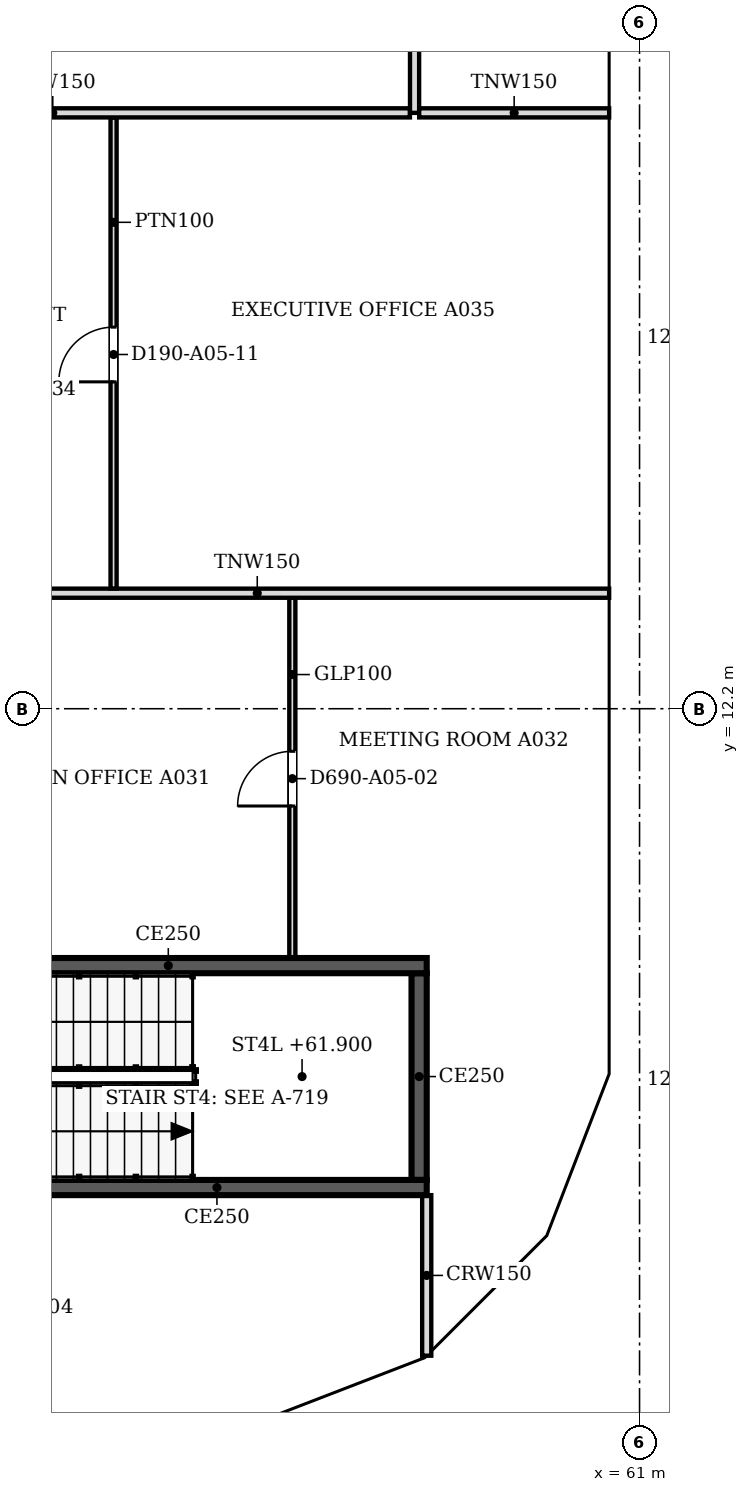
"""IFC4 building model, lengths in metres.
Left out: names, types, materials, properties, quantities, classifications, styles, units other than length and angle.
Written with IfcOpenShell. Run it as: python <this file> out.ifc"""

import sys

from ifc_helpers import new_model, si_unit, direction, frame, frame_2d, origin, place, context, subcontext, project, spatial, polyline, rectangle, outline, extrude, faceted_brep, source, transform, mapped, element, fill, save


model = new_model("IFC4")
c1 = context("Model", 3, precision=1e-05, world=origin(), true_north=direction((0.0, 1.0)))
c2 = subcontext(c1, "Body", "Model", "MODEL_VIEW")
j1 = project(units=[si_unit("LENGTHUNIT", "METRE"), si_unit("PLANEANGLEUNIT", "RADIAN")], contexts=[c1])
p1 = place(None, origin())
s1 = spatial("IfcSite", under=j1, at=p1, CompositionType="ELEMENT")
p2 = place(p1, origin())
s2 = spatial("IfcBuilding", under=s1, at=p2, CompositionType="ELEMENT")
p3 = place(p2, frame((0.0, 0.0, 60.0)))
s3 = spatial("IfcBuildingStorey", under=s2, at=p3, CompositionType="ELEMENT", Elevation=60.0)
m1 = source(origin(), c2, "Body", "Brep", [
    faceted_brep([(2.95, -0.25, 0.0), (3.003, -0.25, 0.068), (3.003, -0.25, 7.532), (2.95, -0.25, 7.6), (0.0, -0.25, 3.8), (0.047, 0.25, 3.86), (2.898, 0.25, 7.532), (2.898, 0.25, 0.068), (0.047, 0.25, 3.74), (2.95, 0.0, 0.0), (2.95, 0.0, 7.6), (0.0, 0.0, 3.8)], [[[0, 1, 2, 3, 4]], [[5, 6, 7, 8]], [[1, 0, 9]], [[10, 3, 2]], [[6, 5, 11, 4, 3, 10]], [[8, 7, 9, 0, 4, 11]], [[8, 11, 5]], [[1, 9, 7, 6, 10, 2]]]),
])
p4 = place(p3, frame((54.854, 0.25, -3.8), z_axis=(0.0, 0.0, 1.0), x_axis=(0.932970071518, 0.359953949349, 0.0)))
e1 = element("IfcWall", 1, at=p4, inside=s3, PredefinedType="SOLIDWALL", context=c2, shape_type="MappedRepresentation", body=[
    mapped(m1, transform((0.0, 0.0, 0.0), scale=1.0)),
])
m2 = source(origin(), c2, "Body", "SweptSolid", [
    extrude(outline(polyline([(2.75, 6.935), (0.316, 3.8), (2.75, 0.665), (2.75, 6.935)])), frame((0.0, 0.26, 0.0), z_axis=(0.0, -1.0, 0.0), x_axis=(1.0, 0.0, 0.0)), (0.0, 0.0, 1.0), 0.52),
])
p5 = place(p4, origin())
e2 = element("IfcOpeningElement", 2, at=p5, cuts=e1, PredefinedType="OPENING", context=c2, shape_type="MappedRepresentation", body=[
    mapped(m2, transform((0.0, 0.0, 0.0), scale=1.0)),
])
m3 = source(origin(), c2, "Body", "Brep", [
    faceted_brep([(0.053, -0.25, 0.0), (2.997, -0.25, 3.8), (0.053, -0.25, 7.6), (0.0, -0.25, 7.532), (0.0, -0.25, 0.068), (0.106, 0.25, 7.532), (2.944, 0.25, 3.868), (2.944, 0.25, 3.732), (0.106, 0.25, 0.068), (2.997, 0.0, 3.8), (0.053, 0.0, 0.0), (0.053, 0.0, 7.6)], [[[0, 1, 2, 3, 4]], [[5, 6, 7, 8]], [[8, 7, 9, 1, 0, 10]], [[6, 5, 11, 2, 1, 9]], [[3, 2, 11]], [[10, 0, 4]], [[8, 10, 4, 3, 11, 5]], [[9, 7, 6]]]),
])
p6 = place(p3, frame((57.569, 1.274, -3.8), z_axis=(0.0, 0.0, 1.0), x_axis=(0.707066050402, 0.707147509625, 0.0)))
e3 = element("IfcWall", 3, at=p6, inside=s3, PredefinedType="SOLIDWALL", context=c2, shape_type="MappedRepresentation", body=[
    mapped(m3, transform((0.0, 0.0, 0.0), scale=1.0)),
])
m4 = source(origin(), c2, "Body", "SweptSolid", [
    extrude(outline(polyline([(0.253, 0.666), (2.681, 3.8), (0.253, 6.934), (0.253, 0.666)])), frame((0.0, 0.26, 0.0), z_axis=(0.0, -1.0, 0.0), x_axis=(1.0, 0.0, 0.0)), (0.0, 0.0, 1.0), 0.52),
])
p7 = place(p6, origin())
e4 = element("IfcOpeningElement", 4, at=p7, cuts=e3, PredefinedType="OPENING", context=c2, shape_type="MappedRepresentation", body=[
    mapped(m4, transform((0.0, 0.0, 0.0), scale=1.0)),
])
m5 = source(origin(), c2, "Body", "Brep", [
    faceted_brep([(2.95, -0.25, 0.0), (2.997, -0.25, 0.059), (2.997, -0.25, 7.541), (2.95, -0.25, 7.6), (0.0, -0.25, 3.8), (0.053, 0.25, 3.868), (2.904, 0.25, 7.54), (2.904, 0.25, 0.06), (0.053, 0.25, 3.732), (2.95, 0.0, 0.0), (2.95, 0.0, 7.6), (0.0, 0.0, 3.8)], [[[0, 1, 2, 3, 4]], [[5, 6, 7, 8]], [[1, 0, 9]], [[10, 3, 2]], [[6, 5, 11, 4, 3, 10]], [[8, 7, 9, 0, 4, 11]], [[8, 11, 5]], [[1, 9, 7, 6, 10, 2]]]),
])
p8 = place(p3, frame((59.688, 3.394, -3.8), z_axis=(0.0, 0.0, 1.0), x_axis=(0.359972353723, 0.932962970624, 0.0)))
e5 = element("IfcWall", 5, at=p8, inside=s3, PredefinedType="SOLIDWALL", context=c2, shape_type="MappedRepresentation", body=[
    mapped(m5, transform((0.0, 0.0, 0.0), scale=1.0)),
])
p9 = place(p8, origin())
e6 = element("IfcOpeningElement", 6, at=p9, cuts=e5, PredefinedType="OPENING", context=c2, shape_type="MappedRepresentation", body=[
    mapped(m2, transform((0.0, 0.0, 0.0), scale=1.0)),
])
m6 = source(origin(), c2, "Body", "Brep", [
    faceted_brep([(0.047, -0.25, 0.0), (3.05, -0.25, 3.8), (0.047, -0.25, 7.6), (0.0, -0.25, 7.54), (0.0, -0.25, 0.06), (0.093, 0.25, 7.541), (3.05, 0.25, 3.8), (0.093, 0.25, 0.059), (0.047, 0.0, 0.0), (0.047, 0.0, 7.6)], [[[0, 1, 2, 3, 4]], [[5, 6, 7]], [[7, 6, 1, 0, 8]], [[6, 5, 9, 2, 1]], [[3, 2, 9]], [[8, 0, 4]], [[7, 8, 4, 3, 9, 5]]]),
])
p10 = place(p3, frame((60.75, 6.1, -3.8), z_axis=(0.0, 0.0, 1.0), x_axis=(0.0, 1.0, 0.0)))
e7 = element("IfcWall", 7, at=p10, inside=s3, PredefinedType="SOLIDWALL", context=c2, shape_type="MappedRepresentation", body=[
    mapped(m6, transform((0.0, 0.0, 0.0), scale=1.0)),
])
m7 = source(origin(), c2, "Body", "SweptSolid", [
    extrude(outline(polyline([(0.247, 0.656), (2.731, 3.8), (0.247, 6.944), (0.247, 0.656)])), frame((0.0, 0.26, 0.0), z_axis=(0.0, -1.0, 0.0), x_axis=(1.0, 0.0, 0.0)), (0.0, 0.0, 1.0), 0.52),
])
p11 = place(p10, origin())
e8 = element("IfcOpeningElement", 8, at=p11, cuts=e7, PredefinedType="OPENING", context=c2, shape_type="MappedRepresentation", body=[
    mapped(m7, transform((0.0, 0.0, 0.0), scale=1.0)),
])
m8 = source(origin(), c2, "Body", "SweptSolid", [
    extrude(outline(polyline([(3.05, 0.0), (6.1, 3.8), (3.05, 7.6), (0.0, 3.8), (3.05, 0.0)])), frame((0.0, 0.25, 0.0), z_axis=(0.0, -1.0, 0.0), x_axis=(1.0, 0.0, 0.0)), (0.0, 0.0, 1.0), 0.5),
])
p12 = place(p3, frame((60.75, 9.15, -3.8), z_axis=(0.0, 0.0, 1.0), x_axis=(0.0, 1.0, 0.0)))
e9 = element("IfcWall", 9, at=p12, inside=s3, PredefinedType="SOLIDWALL", context=c2, shape_type="MappedRepresentation", body=[
    mapped(m8, transform((0.0, 0.0, 0.0), scale=1.0)),
])
m9 = source(origin(), c2, "Body", "SweptSolid", [
    extrude(outline(polyline([(3.05, 0.399), (5.78, 3.8), (3.05, 7.201), (0.321, 3.8), (3.05, 0.399)])), frame((0.0, 0.26, 0.0), z_axis=(0.0, -1.0, 0.0), x_axis=(1.0, 0.0, 0.0)), (0.0, 0.0, 1.0), 0.52),
])
p13 = place(p12, origin())
e10 = element("IfcOpeningElement", 10, at=p13, cuts=e9, PredefinedType="OPENING", context=c2, shape_type="MappedRepresentation", body=[
    mapped(m9, transform((0.0, 0.0, 0.0), scale=1.0)),
])
p14 = place(p3, frame((60.75, 15.25, -3.8), z_axis=(0.0, 0.0, 1.0), x_axis=(0.0, 1.0, 0.0)))
e11 = element("IfcWall", 11, at=p14, inside=s3, PredefinedType="SOLIDWALL", context=c2, shape_type="MappedRepresentation", body=[
    mapped(m8, transform((0.0, 0.0, 0.0), scale=1.0)),
])
p15 = place(p14, origin())
e12 = element("IfcOpeningElement", 12, at=p15, cuts=e11, PredefinedType="OPENING", context=c2, shape_type="MappedRepresentation", body=[
    mapped(m9, transform((0.0, 0.0, 0.0), scale=1.0)),
])
m10 = source(origin(), c2, "Body", "Brep", [
    faceted_brep([(3.05, -0.25, 0.0), (6.1, -0.25, 3.8), (6.1, -0.25, 3.8), (3.05, -0.25, 7.6), (0.0, -0.25, 3.8), (0.0, 0.25, 3.8), (3.05, 0.25, 7.6), (6.1, 0.25, 3.8), (6.1, 0.25, 3.8), (3.05, 0.25, 0.0)], [[[0, 1, 2, 3, 4]], [[5, 6, 7, 8, 9]], [[9, 8, 1, 0]], [[7, 6, 3, 2]], [[6, 5, 4, 3]], [[5, 9, 0, 4]], [[1, 8, 7, 2]]]),
])
p16 = place(p3, frame((60.75, 21.35, -3.8), z_axis=(0.0, 0.0, 1.0), x_axis=(0.0, 1.0, 0.0)))
e13 = element("IfcWall", 13, at=p16, inside=s3, PredefinedType="SOLIDWALL", context=c2, shape_type="MappedRepresentation", body=[
    mapped(m10, transform((0.0, 0.0, 0.0), scale=1.0)),
])
p17 = place(p16, origin())
e14 = element("IfcOpeningElement", 14, at=p17, cuts=e13, PredefinedType="OPENING", context=c2, shape_type="MappedRepresentation", body=[
    mapped(m9, transform((0.0, 0.0, 0.0), scale=1.0)),
])
m11 = source(origin(), c2, "Body", "Brep", [
    faceted_brep([(0.047, -0.25, 0.0), (2.997, -0.25, 3.8), (0.0, -0.25, 3.8), (0.0, -0.25, 0.059), (0.093, 0.25, 3.8), (2.944, 0.25, 3.8), (2.944, 0.25, 3.732), (0.093, 0.25, 0.06), (2.997, 0.0, 3.8), (0.047, 0.0, 0.0)], [[[0, 1, 2, 3]], [[4, 5, 6, 7]], [[7, 6, 8, 1, 0, 9]], [[5, 4, 2, 1, 8]], [[9, 0, 3]], [[7, 9, 3, 2, 4]], [[6, 5, 8]]]),
])
p18 = place(p3, frame((54.81, 0.233, 0.0), z_axis=(0.0, 0.0, 1.0), x_axis=(0.932990326376, 0.359901446078, 0.0)))
e15 = element("IfcWall", 15, at=p18, inside=s3, PredefinedType="SOLIDWALL", context=c2, shape_type="MappedRepresentation", body=[
    mapped(m11, transform((0.0, 0.0, 0.0), scale=1.0)),
])
m12 = source(origin(), c2, "Body", "SweptSolid", [
    extrude(outline(polyline([(0.247, 0.665), (2.487, 3.55), (0.247, 3.55), (0.247, 0.665)])), frame((0.0, 0.26, 0.0), z_axis=(0.0, -1.0, 0.0), x_axis=(1.0, 0.0, 0.0)), (0.0, 0.0, 1.0), 0.52),
])
p19 = place(p18, origin())
e16 = element("IfcOpeningElement", 16, at=p19, cuts=e15, PredefinedType="OPENING", context=c2, shape_type="MappedRepresentation", body=[
    mapped(m12, transform((0.0, 0.0, 0.0), scale=1.0)),
])
m13 = source(origin(), c2, "Body", "Brep", [
    faceted_brep([(2.944, -0.25, 0.0), (2.997, -0.25, 0.068), (2.997, -0.25, 3.8), (0.0, -0.25, 3.8), (0.053, 0.25, 3.8), (2.891, 0.25, 3.8), (2.891, 0.25, 0.068), (0.053, 0.25, 3.732), (2.944, 0.0, 0.0), (0.0, 0.0, 3.8)], [[[0, 1, 2, 3]], [[4, 5, 6, 7]], [[1, 0, 8]], [[5, 4, 9, 3, 2]], [[7, 6, 8, 0, 3, 9]], [[7, 9, 4]], [[1, 8, 6, 5, 2]]]),
])
p20 = place(p3, frame((57.606, 1.312, 0.0), z_axis=(0.0, 0.0, 1.0), x_axis=(0.707147509625, 0.707066050402, 0.0)))
e17 = element("IfcWall", 17, at=p20, inside=s3, PredefinedType="SOLIDWALL", context=c2, shape_type="MappedRepresentation", body=[
    mapped(m13, transform((0.0, 0.0, 0.0), scale=1.0)),
])
m14 = source(origin(), c2, "Body", "SweptSolid", [
    extrude(outline(polyline([(2.744, 3.55), (0.51, 3.55), (2.744, 0.666), (2.744, 3.55)])), frame((0.0, 0.26, 0.0), z_axis=(0.0, -1.0, 0.0), x_axis=(1.0, 0.0, 0.0)), (0.0, 0.0, 1.0), 0.52),
])
p21 = place(p20, origin())
e18 = element("IfcOpeningElement", 18, at=p21, cuts=e17, PredefinedType="OPENING", context=c2, shape_type="MappedRepresentation", body=[
    mapped(m14, transform((0.0, 0.0, 0.0), scale=1.0)),
])
m15 = source(origin(), c2, "Body", "Brep", [
    faceted_brep([(0.053, -0.25, 0.0), (3.003, -0.25, 3.8), (0.0, -0.25, 3.8), (0.0, -0.25, 0.068), (0.106, 0.25, 3.8), (2.957, 0.25, 3.8), (2.957, 0.25, 3.74), (0.106, 0.25, 0.068), (3.003, 0.0, 3.8), (0.053, 0.0, 0.0)], [[[0, 1, 2, 3]], [[4, 5, 6, 7]], [[7, 6, 8, 1, 0, 9]], [[5, 4, 2, 1, 8]], [[9, 0, 3]], [[7, 9, 3, 2, 4]], [[6, 5, 8]]]),
])
p22 = place(p3, frame((59.669, 3.344, 0.0), z_axis=(0.0, 0.0, 1.0), x_axis=(0.35992665181, 0.932980602862, 0.0)))
e19 = element("IfcWall", 19, at=p22, inside=s3, PredefinedType="SOLIDWALL", context=c2, shape_type="MappedRepresentation", body=[
    mapped(m15, transform((0.0, 0.0, 0.0), scale=1.0)),
])
m16 = source(origin(), c2, "Body", "SweptSolid", [
    extrude(outline(polyline([(0.253, 0.665), (2.493, 3.55), (0.253, 3.55), (0.253, 0.665)])), frame((0.0, 0.26, 0.0), z_axis=(0.0, -1.0, 0.0), x_axis=(1.0, 0.0, 0.0)), (0.0, 0.0, 1.0), 0.52),
])
p23 = place(p22, origin())
e20 = element("IfcOpeningElement", 20, at=p23, cuts=e19, PredefinedType="OPENING", context=c2, shape_type="MappedRepresentation", body=[
    mapped(m16, transform((0.0, 0.0, 0.0), scale=1.0)),
])
m17 = source(origin(), c2, "Body", "Brep", [
    faceted_brep([(3.003, -0.25, 0.0), (6.053, -0.25, 3.8), (0.0, -0.25, 3.8), (0.047, 0.25, 3.8), (6.053, 0.25, 3.8), (3.003, 0.25, 0.0), (0.047, 0.25, 3.741), (0.0, 0.0, 3.8)], [[[0, 1, 2]], [[3, 4, 5, 6]], [[5, 4, 1, 0]], [[4, 3, 7, 2, 1]], [[6, 5, 0, 2, 7]], [[6, 7, 3]]]),
])
p24 = place(p3, frame((60.75, 6.146, 0.0), z_axis=(0.0, 0.0, 1.0), x_axis=(0.0, 1.0, 0.0)))
e21 = element("IfcWall", 21, at=p24, inside=s3, PredefinedType="SOLIDWALL", context=c2, shape_type="MappedRepresentation", body=[
    mapped(m17, transform((0.0, 0.0, 0.0), scale=1.0)),
])
m18 = source(origin(), c2, "Body", "SweptSolid", [
    extrude(outline(polyline([(3.005, 0.401), (5.532, 3.55), (0.516, 3.55), (3.005, 0.401)])), frame((0.0, 0.26, 0.0), z_axis=(0.0, -1.0, 0.0), x_axis=(1.0, 0.0, 0.0)), (0.0, 0.0, 1.0), 0.52),
])
p25 = place(p24, origin())
e22 = element("IfcOpeningElement", 22, at=p25, cuts=e21, PredefinedType="OPENING", context=c2, shape_type="MappedRepresentation", body=[
    mapped(m18, transform((0.0, 0.0, 0.0), scale=1.0)),
])
m19 = source(origin(), c2, "Body", "SweptSolid", [
    extrude(outline(polyline([(3.05, 0.0), (6.1, 3.8), (0.0, 3.8), (3.05, 0.0)])), frame((0.0, 0.25, 0.0), z_axis=(0.0, -1.0, 0.0), x_axis=(1.0, 0.0, 0.0)), (0.0, 0.0, 1.0), 0.5),
])
p26 = place(p3, frame((60.75, 12.2, 0.0), z_axis=(0.0, 0.0, 1.0), x_axis=(0.0, 1.0, 0.0)))
e23 = element("IfcWall", 23, at=p26, inside=s3, PredefinedType="SOLIDWALL", context=c2, shape_type="MappedRepresentation", body=[
    mapped(m19, transform((0.0, 0.0, 0.0), scale=1.0)),
])
m20 = source(origin(), c2, "Body", "SweptSolid", [
    extrude(outline(polyline([(3.05, 0.399), (5.579, 3.55), (0.521, 3.55), (3.05, 0.399)])), frame((0.0, 0.26, 0.0), z_axis=(0.0, -1.0, 0.0), x_axis=(1.0, 0.0, 0.0)), (0.0, 0.0, 1.0), 0.52),
])
p27 = place(p26, origin())
e24 = element("IfcOpeningElement", 24, at=p27, cuts=e23, PredefinedType="OPENING", context=c2, shape_type="MappedRepresentation", body=[
    mapped(m20, transform((0.0, 0.0, 0.0), scale=1.0)),
])
m21 = source(origin(), c2, "Body", "Brep", [
    faceted_brep([(3.05, -0.25, 0.0), (6.1, -0.25, 3.8), (6.1, -0.25, 3.8), (0.0, -0.25, 3.8), (0.0, 0.25, 3.8), (6.1, 0.25, 3.8), (6.1, 0.25, 3.8), (3.05, 0.25, 0.0)], [[[0, 1, 2, 3]], [[4, 5, 6, 7]], [[7, 6, 1, 0]], [[5, 4, 3, 2]], [[4, 7, 0, 3]], [[1, 6, 5, 2]]]),
])
p28 = place(p3, frame((60.75, 18.3, 0.0), z_axis=(0.0, 0.0, 1.0), x_axis=(0.0, 1.0, 0.0)))
e25 = element("IfcWall", 25, at=p28, inside=s3, PredefinedType="SOLIDWALL", context=c2, shape_type="MappedRepresentation", body=[
    mapped(m21, transform((0.0, 0.0, 0.0), scale=1.0)),
])
p29 = place(p28, origin())
e26 = element("IfcOpeningElement", 26, at=p29, cuts=e25, PredefinedType="OPENING", context=c2, shape_type="MappedRepresentation", body=[
    mapped(m20, transform((0.0, 0.0, 0.0), scale=1.0)),
])
p30 = place(p3, frame((57.5, 4.325, 0.0), z_axis=(0.0, 0.0, 1.0), x_axis=(-1.0, 0.0, 0.0)))
e27 = element("IfcWall", 27, at=p30, inside=s3, PredefinedType="SOLIDWALL", context=c2, shape_type="SweptSolid", body=[
    extrude(rectangle(XDim=8.5, YDim=0.25, at=frame_2d((4.25, 0.0))), origin(), (0.0, 0.0, 1.0), 3.8),
])
m22 = source(origin(), c2, "Body", "SweptSolid", [
    extrude(rectangle(XDim=1.2, YDim=2.1, at=frame_2d((0.6, 1.05))), frame((0.0, 0.135, 0.0), z_axis=(0.0, -1.0, 0.0), x_axis=(1.0, 0.0, 0.0)), (0.0, 0.0, 1.0), 0.27),
])
p31 = place(p30, frame((6.9, 0.0, 0.0)))
e28 = element("IfcOpeningElement", 28, at=p31, cuts=e27, PredefinedType="OPENING", context=c2, shape_type="MappedRepresentation", body=[
    mapped(m22, transform((0.0, 0.0, 0.0), scale=1.0)),
])
p32 = place(p3, frame((49.0, 7.975, 0.0), z_axis=(0.0, 0.0, 1.0), x_axis=(1.0, 0.0, 0.0)))
e29 = element("IfcWall", 29, at=p32, inside=s3, PredefinedType="SOLIDWALL", context=c2, shape_type="SweptSolid", body=[
    extrude(rectangle(XDim=8.5, YDim=0.25, at=frame_2d((4.25, 0.0))), origin(), (0.0, 0.0, 1.0), 3.8),
])
p33 = place(p3, frame((57.375, 7.85, 0.0), z_axis=(0.0, 0.0, 1.0), x_axis=(0.0, -1.0, 0.0)))
e30 = element("IfcWall", 30, at=p33, inside=s3, PredefinedType="SOLIDWALL", context=c2, shape_type="SweptSolid", body=[
    extrude(rectangle(XDim=3.4, YDim=0.25, at=frame_2d((1.7, 0.0))), origin(), (0.0, 0.0, 1.0), 3.8),
])
p34 = place(p3, frame((57.5, 1.559, 0.0), z_axis=(0.0, 0.0, 1.0), x_axis=(0.0, 1.0, 0.0)))
e31 = element("IfcWall", 31, at=p34, inside=s3, PredefinedType="PARTITIONING", context=c2, shape_type="SweptSolid", body=[
    extrude(rectangle(XDim=2.641, YDim=0.15, at=frame_2d((1.32, 0.0))), origin(), (0.0, 0.0, 1.0), 2.888),
])
p35 = place(p3, frame((55.29, 14.024, 0.0), z_axis=(0.0, 0.0, 1.0), x_axis=(0.0, -1.0, 0.0)))
e32 = element("IfcWall", 32, at=p35, inside=s3, PredefinedType="PARTITIONING", context=c2, shape_type="SweptSolid", body=[
    extrude(rectangle(XDim=5.924, YDim=0.1, at=frame_2d((2.962, 0.0))), origin(), (0.0, 0.0, 1.0), 2.888),
])
m23 = source(origin(), c2, "Body", "SweptSolid", [
    extrude(rectangle(XDim=0.9, YDim=2.1, at=frame_2d((0.45, 1.05))), frame((0.0, 0.06, 0.0), z_axis=(0.0, -1.0, 0.0), x_axis=(1.0, 0.0, 0.0)), (0.0, 0.0, 1.0), 0.12),
])
p36 = place(p35, frame((2.524, 0.0, 0.0)))
e33 = element("IfcOpeningElement", 33, at=p36, cuts=e32, PredefinedType="OPENING", context=c2, shape_type="MappedRepresentation", body=[
    mapped(m23, transform((0.0, 0.0, 0.0), scale=1.0)),
])
p37 = place(p3, frame((48.926, 14.1, 0.0), z_axis=(0.0, 0.0, 1.0), x_axis=(1.0, 0.0, 0.0)))
e34 = element("IfcWall", 34, at=p37, inside=s3, PredefinedType="PARTITIONING", context=c2, shape_type="SweptSolid", body=[
    extrude(rectangle(XDim=11.574, YDim=0.15, at=frame_2d((5.787, 0.0))), origin(), (0.0, 0.0, 1.0), 2.888),
])
p38 = place(p3, frame((52.35, 21.924, 0.0), z_axis=(0.0, 0.0, 1.0), x_axis=(0.0, -1.0, 0.0)))
e35 = element("IfcWall", 35, at=p38, inside=s3, PredefinedType="PARTITIONING", context=c2, shape_type="SweptSolid", body=[
    extrude(rectangle(XDim=7.748, YDim=0.1, at=frame_2d((3.874, 0.0))), origin(), (0.0, 0.0, 1.0), 2.888),
])
p39 = place(p38, frame((3.448, 0.0, 0.0)))
e36 = element("IfcOpeningElement", 36, at=p39, cuts=e35, PredefinedType="OPENING", context=c2, shape_type="MappedRepresentation", body=[
    mapped(m23, transform((0.0, 0.0, 0.0), scale=1.0)),
])
p40 = place(p3, frame((45.476, 22.0, 0.0), z_axis=(0.0, 0.0, 1.0), x_axis=(1.0, 0.0, 0.0)))
e37 = element("IfcWall", 37, at=p40, inside=s3, PredefinedType="PARTITIONING", context=c2, shape_type="SweptSolid", body=[
    extrude(rectangle(XDim=11.748, YDim=0.15, at=frame_2d((5.874, 0.0))), origin(), (0.0, 0.0, 1.0), 2.888),
])
p41 = place(p3, frame((57.3, 30.6, 0.0), z_axis=(0.0, 0.0, 1.0), x_axis=(0.0, -1.0, 0.0)))
e38 = element("IfcWall", 38, at=p41, inside=s3, PredefinedType="PARTITIONING", context=c2, shape_type="SweptSolid", body=[
    extrude(rectangle(XDim=8.6, YDim=0.15, at=frame_2d((4.3, 0.0))), origin(), (0.0, 0.0, 1.0), 2.888),
])
m24 = source(origin(), c2, "Body", "SweptSolid", [
    extrude(rectangle(XDim=0.9, YDim=2.1, at=frame_2d((0.45, 1.05))), frame((0.0, 0.085, 0.0), z_axis=(0.0, -1.0, 0.0), x_axis=(1.0, 0.0, 0.0)), (0.0, 0.0, 1.0), 0.17),
])
p42 = place(p41, frame((3.9, 0.0, 0.0)))
e39 = element("IfcOpeningElement", 39, at=p42, cuts=e38, PredefinedType="OPENING", context=c2, shape_type="MappedRepresentation", body=[
    mapped(m24, transform((0.0, 0.0, 0.0), scale=1.0)),
])
p43 = place(p3, frame((57.376, 22.0, 0.0), z_axis=(0.0, 0.0, 1.0), x_axis=(1.0, 0.0, 0.0)))
e40 = element("IfcWall", 40, at=p43, inside=s3, PredefinedType="PARTITIONING", context=c2, shape_type="SweptSolid", body=[
    extrude(rectangle(XDim=3.124, YDim=0.15, at=frame_2d((1.562, 0.0))), origin(), (0.0, 0.0, 1.0), 2.888),
])
m25 = source(origin(), c2, "Body", "SweptSolid", [
    extrude(rectangle(XDim=0.9, YDim=2.1, at=frame_2d((0.45, 1.05))), frame((0.0, 0.025, 0.0), z_axis=(0.0, -1.0, 0.0), x_axis=(1.0, 0.0, 0.0)), (0.0, 0.0, 1.0), 0.05),
])
p44 = place(p36, origin())
e41 = element("IfcDoor", 41, at=p44, inside=s3, OperationType="SINGLE_SWING_RIGHT", PredefinedType="DOOR", context=c2, shape_type="MappedRepresentation", body=[
    mapped(m25, transform((0.0, 0.0, 0.0), scale=1.0)),
])
fill(e33, e41)
p45 = place(p39, origin())
e42 = element("IfcDoor", 42, at=p45, inside=s3, OperationType="SINGLE_SWING_RIGHT", PredefinedType="DOOR", context=c2, shape_type="MappedRepresentation", body=[
    mapped(m25, transform((0.0, 0.0, 0.0), scale=1.0)),
])
fill(e36, e42)
save(model, sys.argv[1])
